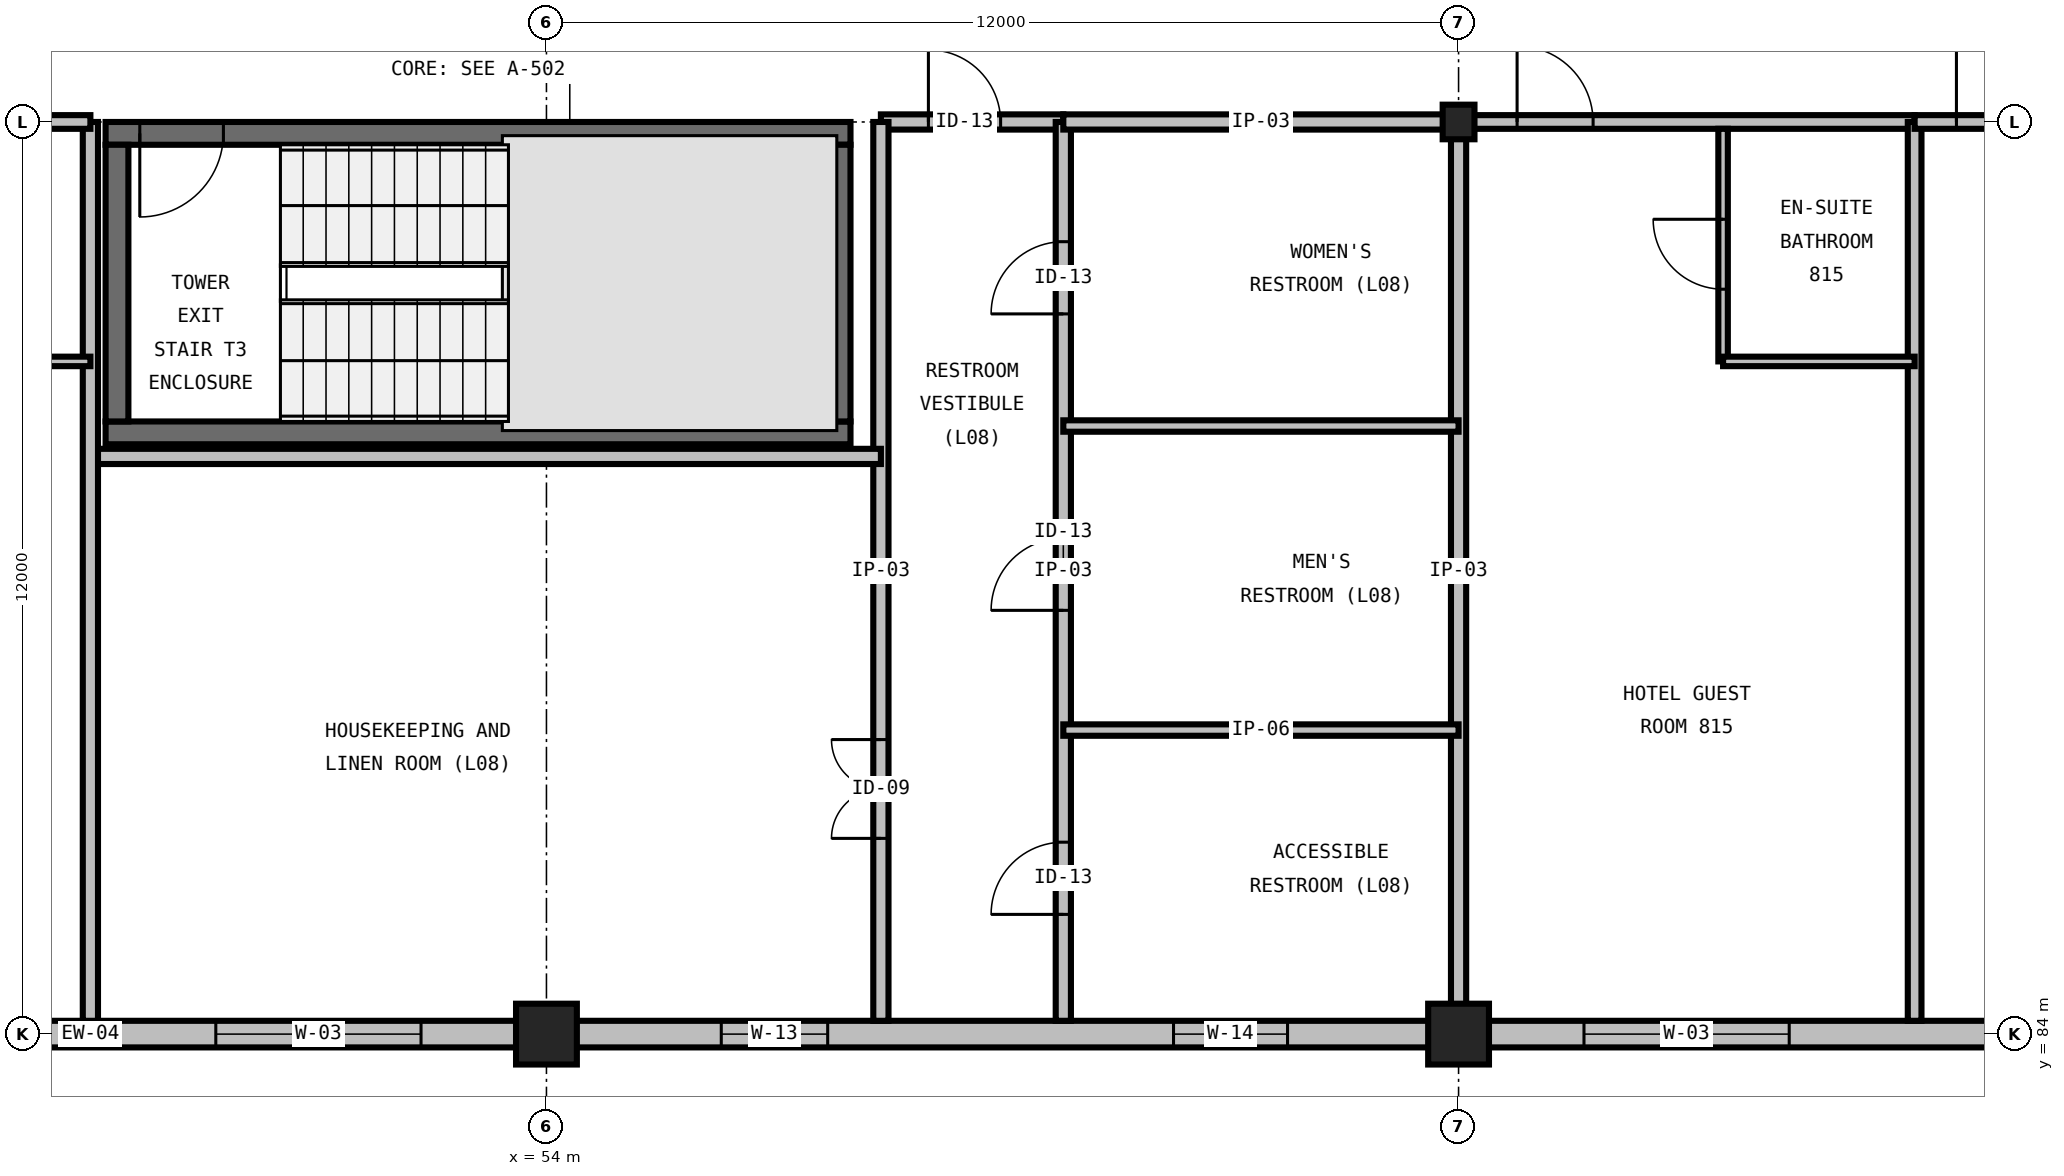
"""IFC4 building model, lengths in metres.
Left out: names, types, materials, properties, quantities, classifications, styles, units other than length and angle.
Written with IfcOpenShell. Run it as: python <this file> out.ifc"""

import sys

from ifc_helpers import new_model, si_unit, direction, frame, frame_2d, origin, origin_2d, place, context, subcontext, project, spatial, rectangle, i_section, extrude, element, fill, save


model = new_model("IFC4")
c1 = context("Model", 3, precision=1e-05, world=origin(), true_north=direction((0.0, 1.0)))
c2 = subcontext(c1, "Body", "Model", "MODEL_VIEW")
j1 = project(units=[si_unit("LENGTHUNIT", "METRE"), si_unit("PLANEANGLEUNIT", "RADIAN")], contexts=[c1])
p1 = place(None, origin())
s1 = spatial("IfcSite", under=j1, at=p1, CompositionType="ELEMENT")
p2 = place(p1, origin())
s2 = spatial("IfcBuilding", under=s1, at=p2, CompositionType="ELEMENT")
p3 = place(p2, frame((0.0, 0.0, 38.4)))
s3 = spatial("IfcBuildingStorey", under=s2, at=p3, CompositionType="ELEMENT", Elevation=38.4)
for number, where, z_axis, x_axis in (
    (1, (54.0, 84.0, 0.0), (0.0, 0.0, 1.0), (1.0, 0.0, 0.0)),
    (2, (66.0, 84.0, 0.0), (0.0, 0.0, 1.0), (1.0, 0.0, 0.0)),
):
    element("IfcColumn", number, at=place(p3, frame(where, z_axis=z_axis, x_axis=x_axis)), inside=s3, PredefinedType="COLUMN", context=c2, shape_type="SweptSolid", body=[
        extrude(rectangle(XDim=0.8, YDim=0.8, at=origin_2d()), origin(), (0.0, 0.0, 1.0), 3.6),
    ])
p4 = place(p3, frame((66.0, 96.0, 0.0), z_axis=(0.0, 0.0, 1.0), x_axis=(1.0, 0.0, 0.0)))
e3 = element("IfcColumn", 3, at=p4, inside=s3, PredefinedType="COLUMN", context=c2, shape_type="SweptSolid", body=[
    extrude(i_section(OverallWidth=0.419, OverallDepth=0.455, WebThickness=0.042, FlangeThickness=0.068, FilletRadius=0.031, at=origin_2d()), origin(), (0.0, 0.0, 1.0), 3.6),
])
p5 = place(p3, frame((48.2, 91.91, 0.0), z_axis=(0.0, 0.0, 1.0), x_axis=(1.0, 0.0, 0.0)))
e4 = element("IfcWall", 4, at=p5, inside=s3, PredefinedType="SHEAR", context=c2, shape_type="SweptSolid", body=[
    extrude(rectangle(XDim=9.8, YDim=0.3, at=frame_2d((4.9, 0.0))), origin(), (0.0, 0.0, 1.0), 3.6),
])
p6 = place(p3, frame((58.0, 95.85, 0.0), z_axis=(0.0, 0.0, 1.0), x_axis=(-1.0, 0.0, 0.0)))
e5 = element("IfcWall", 5, at=p6, inside=s3, PredefinedType="SHEAR", context=c2, shape_type="SweptSolid", body=[
    extrude(rectangle(XDim=9.8, YDim=0.3, at=frame_2d((4.9, 0.0))), origin(), (0.0, 0.0, 1.0), 3.6),
])
p7 = place(p6, frame((8.25, 0.0, 0.0)))
e6 = element("IfcOpeningElement", 6, at=p7, cuts=e5, PredefinedType="OPENING", context=c2, shape_type="SweptSolid", body=[
    extrude(rectangle(XDim=1.1, YDim=2.2, at=frame_2d((0.55, 1.1))), frame((0.0, 0.165, 0.0), z_axis=(0.0, -1.0, 0.0), x_axis=(1.0, 0.0, 0.0)), (0.0, 0.0, 1.0), 0.33),
])
for number, where, z_axis, x_axis in (
    (7, (48.35, 95.7, 0.0), (0.0, 0.0, 1.0), (0.0, -1.0, 0.0)),
    (8, (57.85, 92.06, 0.0), (0.0, 0.0, 1.0), (0.0, 1.0, 0.0)),
):
    element("IfcWall", number, at=place(p3, frame(where, z_axis=z_axis, x_axis=x_axis)), inside=s3, PredefinedType="SHEAR", context=c2, shape_type="SweptSolid", body=[
        extrude(rectangle(XDim=3.64, YDim=0.3, at=frame_2d((1.82, 0.0))), origin(), (0.0, 0.0, 1.0), 3.6),
    ])
p8 = place(p3, frame((42.0, 84.0, 0.0), z_axis=(0.0, 0.0, 1.0), x_axis=(1.0, 0.0, 0.0)))
e9 = element("IfcWall", 9, at=p8, inside=s3, PredefinedType="STANDARD", context=c2, shape_type="SweptSolid", body=[
    extrude(rectangle(XDim=12.0, YDim=0.35, at=frame_2d((6.0, 0.0))), origin(), (0.0, 0.0, 1.0), 2.486),
])
p9 = place(p8, frame((1.65, 0.0, 0.72)))
e10 = element("IfcOpeningElement", 10, at=p9, cuts=e9, PredefinedType="OPENING", context=c2, shape_type="SweptSolid", body=[
    extrude(rectangle(XDim=2.7, YDim=1.65, at=frame_2d((1.35, 0.825))), frame((0.0, 0.19, 0.0), z_axis=(0.0, -1.0, 0.0), x_axis=(1.0, 0.0, 0.0)), (0.0, 0.0, 1.0), 0.38),
])
p10 = place(p8, frame((7.65, 0.0, 0.72)))
e11 = element("IfcOpeningElement", 11, at=p10, cuts=e9, PredefinedType="OPENING", context=c2, shape_type="SweptSolid", body=[
    extrude(rectangle(XDim=2.7, YDim=1.65, at=frame_2d((1.35, 0.825))), frame((0.0, 0.19, 0.0), z_axis=(0.0, -1.0, 0.0), x_axis=(1.0, 0.0, 0.0)), (0.0, 0.0, 1.0), 0.38),
])
p11 = place(p3, frame((54.0, 84.0, 0.0), z_axis=(0.0, 0.0, 1.0), x_axis=(1.0, 0.0, 0.0)))
e12 = element("IfcWall", 12, at=p11, inside=s3, PredefinedType="STANDARD", context=c2, shape_type="SweptSolid", body=[
    extrude(rectangle(XDim=12.0, YDim=0.35, at=frame_2d((6.0, 0.0))), origin(), (0.0, 0.0, 1.0), 2.486),
])
p12 = place(p11, frame((2.3, 0.0, 1.0)))
e13 = element("IfcOpeningElement", 13, at=p12, cuts=e12, PredefinedType="OPENING", context=c2, shape_type="SweptSolid", body=[
    extrude(rectangle(XDim=1.4, YDim=1.4, at=frame_2d((0.7, 0.7))), frame((0.0, 0.19, 0.0), z_axis=(0.0, -1.0, 0.0), x_axis=(1.0, 0.0, 0.0)), (0.0, 0.0, 1.0), 0.38),
])
p13 = place(p11, frame((8.25, 0.0, 1.0)))
e14 = element("IfcOpeningElement", 14, at=p13, cuts=e12, PredefinedType="OPENING", context=c2, shape_type="SweptSolid", body=[
    extrude(rectangle(XDim=1.5, YDim=1.35, at=frame_2d((0.75, 0.675))), frame((0.0, 0.19, 0.0), z_axis=(0.0, -1.0, 0.0), x_axis=(1.0, 0.0, 0.0)), (0.0, 0.0, 1.0), 0.38),
])
p14 = place(p3, frame((66.0, 84.0, 0.0), z_axis=(0.0, 0.0, 1.0), x_axis=(1.0, 0.0, 0.0)))
e15 = element("IfcWall", 15, at=p14, inside=s3, PredefinedType="STANDARD", context=c2, shape_type="SweptSolid", body=[
    extrude(rectangle(XDim=12.0, YDim=0.35, at=frame_2d((6.0, 0.0))), origin(), (0.0, 0.0, 1.0), 2.486),
])
p15 = place(p14, frame((1.65, 0.0, 0.72)))
e16 = element("IfcOpeningElement", 16, at=p15, cuts=e15, PredefinedType="OPENING", context=c2, shape_type="SweptSolid", body=[
    extrude(rectangle(XDim=2.7, YDim=1.65, at=frame_2d((1.35, 0.825))), frame((0.0, 0.19, 0.0), z_axis=(0.0, -1.0, 0.0), x_axis=(1.0, 0.0, 0.0)), (0.0, 0.0, 1.0), 0.38),
])
p16 = place(p14, frame((7.65, 0.0, 0.72)))
e17 = element("IfcOpeningElement", 17, at=p16, cuts=e15, PredefinedType="OPENING", context=c2, shape_type="SweptSolid", body=[
    extrude(rectangle(XDim=2.7, YDim=1.65, at=frame_2d((1.35, 0.825))), frame((0.0, 0.19, 0.0), z_axis=(0.0, -1.0, 0.0), x_axis=(1.0, 0.0, 0.0)), (0.0, 0.0, 1.0), 0.38),
])
p17 = place(p3, frame((58.4, 96.0, 0.0), z_axis=(0.0, 0.0, 1.0), x_axis=(1.0, 0.0, 0.0)))
e18 = element("IfcWall", 18, at=p17, inside=s3, PredefinedType="PARTITIONING", context=c2, shape_type="SweptSolid", body=[
    extrude(rectangle(XDim=2.4, YDim=0.2, at=frame_2d((1.2, 0.0))), origin(), (0.0, 0.0, 1.0), 2.359),
])
p18 = place(p17, frame((0.625, 0.0, 0.0)))
e19 = element("IfcOpeningElement", 19, at=p18, cuts=e18, PredefinedType="OPENING", context=c2, shape_type="SweptSolid", body=[
    extrude(rectangle(XDim=0.95, YDim=2.15, at=frame_2d((0.475, 1.075))), frame((0.0, 0.115, 0.0), z_axis=(0.0, -1.0, 0.0), x_axis=(1.0, 0.0, 0.0)), (0.0, 0.0, 1.0), 0.23),
])
p19 = place(p3, frame((58.4, 84.175, 0.0), z_axis=(0.0, 0.0, 1.0), x_axis=(0.0, 1.0, 0.0)))
e20 = element("IfcWall", 20, at=p19, inside=s3, PredefinedType="PARTITIONING", context=c2, shape_type="SweptSolid", body=[
    extrude(rectangle(XDim=11.825, YDim=0.2, at=frame_2d((5.913, 0.0))), origin(), (0.0, 0.0, 1.0), 3.29),
])
p20 = place(p19, frame((2.4, 0.0, 0.0)))
e21 = element("IfcOpeningElement", 21, at=p20, cuts=e20, PredefinedType="OPENING", context=c2, shape_type="SweptSolid", body=[
    extrude(rectangle(XDim=1.3, YDim=2.2, at=frame_2d((0.65, 1.1))), frame((0.0, 0.115, 0.0), z_axis=(0.0, -1.0, 0.0), x_axis=(1.0, 0.0, 0.0)), (0.0, 0.0, 1.0), 0.23),
])
p21 = place(p3, frame((60.8, 84.175, 0.0), z_axis=(0.0, 0.0, 1.0), x_axis=(0.0, 1.0, 0.0)))
e22 = element("IfcWall", 22, at=p21, inside=s3, PredefinedType="PARTITIONING", context=c2, shape_type="SweptSolid", body=[
    extrude(rectangle(XDim=11.825, YDim=0.2, at=frame_2d((5.913, 0.0))), origin(), (0.0, 0.0, 1.0), 3.29),
])
p22 = place(p21, frame((1.4, 0.0, 0.0)))
e23 = element("IfcOpeningElement", 23, at=p22, cuts=e22, PredefinedType="OPENING", context=c2, shape_type="SweptSolid", body=[
    extrude(rectangle(XDim=0.95, YDim=2.15, at=frame_2d((0.475, 1.075))), frame((0.0, 0.115, 0.0), z_axis=(0.0, -1.0, 0.0), x_axis=(1.0, 0.0, 0.0)), (0.0, 0.0, 1.0), 0.23),
])
p23 = place(p21, frame((5.4, 0.0, 0.0)))
e24 = element("IfcOpeningElement", 24, at=p23, cuts=e22, PredefinedType="OPENING", context=c2, shape_type="SweptSolid", body=[
    extrude(rectangle(XDim=0.95, YDim=2.15, at=frame_2d((0.475, 1.075))), frame((0.0, 0.115, 0.0), z_axis=(0.0, -1.0, 0.0), x_axis=(1.0, 0.0, 0.0)), (0.0, 0.0, 1.0), 0.23),
])
p24 = place(p21, frame((9.3, 0.0, 0.0)))
e25 = element("IfcOpeningElement", 25, at=p24, cuts=e22, PredefinedType="OPENING", context=c2, shape_type="SweptSolid", body=[
    extrude(rectangle(XDim=0.95, YDim=2.15, at=frame_2d((0.475, 1.075))), frame((0.0, 0.115, 0.0), z_axis=(0.0, -1.0, 0.0), x_axis=(1.0, 0.0, 0.0)), (0.0, 0.0, 1.0), 0.23),
])
p25 = place(p3, frame((66.0, 84.175, 0.0), z_axis=(0.0, 0.0, 1.0), x_axis=(0.0, 1.0, 0.0)))
e26 = element("IfcWall", 26, at=p25, inside=s3, PredefinedType="PARTITIONING", context=c2, shape_type="SweptSolid", body=[
    extrude(rectangle(XDim=11.825, YDim=0.2, at=frame_2d((5.913, 0.0))), origin(), (0.0, 0.0, 1.0), 2.59),
])
p26 = place(p3, frame((60.8, 96.0, 0.0), z_axis=(0.0, 0.0, 1.0), x_axis=(1.0, 0.0, 0.0)))
e27 = element("IfcWall", 27, at=p26, inside=s3, PredefinedType="PARTITIONING", context=c2, shape_type="SweptSolid", body=[
    extrude(rectangle(XDim=5.2, YDim=0.2, at=frame_2d((2.6, 0.0))), origin(), (0.0, 0.0, 1.0), 2.359),
])
for number, where, z_axis, x_axis in (
    (28, (60.8, 88.0, 0.0), (0.0, 0.0, 1.0), (1.0, 0.0, 0.0)),
    (29, (60.8, 92.0, 0.0), (0.0, 0.0, 1.0), (1.0, 0.0, 0.0)),
):
    element("IfcWall", number, at=place(p3, frame(where, z_axis=z_axis, x_axis=x_axis)), inside=s3, PredefinedType="PARTITIONING", context=c2, shape_type="SweptSolid", body=[
        extrude(rectangle(XDim=5.2, YDim=0.15, at=frame_2d((2.6, 0.0))), origin(), (0.0, 0.0, 1.0), 3.29),
    ])
p27 = place(p3, frame((48.0, 91.6, 0.0), z_axis=(0.0, 0.0, 1.0), x_axis=(1.0, 0.0, 0.0)))
e30 = element("IfcWall", 30, at=p27, inside=s3, PredefinedType="PARTITIONING", context=c2, shape_type="SweptSolid", body=[
    extrude(rectangle(XDim=10.4, YDim=0.2, at=frame_2d((5.2, 0.0))), origin(), (0.0, 0.0, 1.0), 3.29),
])
p28 = place(p3, frame((48.0, 84.175, 0.0), z_axis=(0.0, 0.0, 1.0), x_axis=(0.0, 1.0, 0.0)))
e31 = element("IfcWall", 31, at=p28, inside=s3, PredefinedType="PARTITIONING", context=c2, shape_type="SweptSolid", body=[
    extrude(rectangle(XDim=11.825, YDim=0.2, at=frame_2d((5.913, 0.0))), origin(), (0.0, 0.0, 1.0), 3.29),
])
p29 = place(p3, frame((42.0, 96.0, 0.0), z_axis=(0.0, 0.0, 1.0), x_axis=(1.0, 0.0, 0.0)))
e32 = element("IfcWall", 32, at=p29, inside=s3, PredefinedType="PARTITIONING", context=c2, shape_type="SweptSolid", body=[
    extrude(rectangle(XDim=6.0, YDim=0.18, at=frame_2d((3.0, 0.0))), origin(), (0.0, 0.0, 1.0), 2.359),
])
p30 = place(p29, frame((0.77, 0.0, 0.0)))
e33 = element("IfcOpeningElement", 33, at=p30, cuts=e32, PredefinedType="OPENING", context=c2, shape_type="SweptSolid", body=[
    extrude(rectangle(XDim=1.0, YDim=2.15, at=frame_2d((0.5, 1.075))), frame((0.0, 0.105, 0.0), z_axis=(0.0, -1.0, 0.0), x_axis=(1.0, 0.0, 0.0)), (0.0, 0.0, 1.0), 0.21),
])
p31 = place(p3, frame((45.48, 92.85, 0.0), z_axis=(0.0, 0.0, 1.0), x_axis=(1.0, 0.0, 0.0)))
e34 = element("IfcWall", 34, at=p31, inside=s3, PredefinedType="PARTITIONING", context=c2, shape_type="SweptSolid", body=[
    extrude(rectangle(XDim=2.52, YDim=0.125, at=frame_2d((1.26, 0.0))), origin(), (0.0, 0.0, 1.0), 3.29),
])
p32 = place(p3, frame((66.0, 96.0, 0.0), z_axis=(0.0, 0.0, 1.0), x_axis=(1.0, 0.0, 0.0)))
e35 = element("IfcWall", 35, at=p32, inside=s3, PredefinedType="PARTITIONING", context=c2, shape_type="SweptSolid", body=[
    extrude(rectangle(XDim=6.0, YDim=0.18, at=frame_2d((3.0, 0.0))), origin(), (0.0, 0.0, 1.0), 2.664),
])
p33 = place(p32, frame((0.77, 0.0, 0.0)))
e36 = element("IfcOpeningElement", 36, at=p33, cuts=e35, PredefinedType="OPENING", context=c2, shape_type="SweptSolid", body=[
    extrude(rectangle(XDim=1.0, YDim=2.15, at=frame_2d((0.5, 1.075))), frame((0.0, 0.105, 0.0), z_axis=(0.0, -1.0, 0.0), x_axis=(1.0, 0.0, 0.0)), (0.0, 0.0, 1.0), 0.21),
])
p34 = place(p3, frame((72.0, 84.175, 0.0), z_axis=(0.0, 0.0, 1.0), x_axis=(0.0, 1.0, 0.0)))
e37 = element("IfcWall", 37, at=p34, inside=s3, PredefinedType="PARTITIONING", context=c2, shape_type="SweptSolid", body=[
    extrude(rectangle(XDim=11.825, YDim=0.18, at=frame_2d((5.913, 0.0))), origin(), (0.0, 0.0, 1.0), 3.29),
])
p35 = place(p3, frame((69.48, 92.85, 0.0), z_axis=(0.0, 0.0, 1.0), x_axis=(0.0, 1.0, 0.0)))
e38 = element("IfcWall", 38, at=p35, inside=s3, PredefinedType="PARTITIONING", context=c2, shape_type="SweptSolid", body=[
    extrude(rectangle(XDim=3.06, YDim=0.125, at=frame_2d((1.53, 0.0))), origin(), (0.0, 0.0, 1.0), 3.29),
])
p36 = place(p35, frame((0.95, 0.0, 0.0)))
e39 = element("IfcOpeningElement", 39, at=p36, cuts=e38, PredefinedType="OPENING", context=c2, shape_type="SweptSolid", body=[
    extrude(rectangle(XDim=0.92, YDim=2.1, at=frame_2d((0.46, 1.05))), frame((0.0, 0.077, 0.0), z_axis=(0.0, -1.0, 0.0), x_axis=(1.0, 0.0, 0.0)), (0.0, 0.0, 1.0), 0.155),
])
p37 = place(p3, frame((69.48, 92.85, 0.0), z_axis=(0.0, 0.0, 1.0), x_axis=(1.0, 0.0, 0.0)))
e40 = element("IfcWall", 40, at=p37, inside=s3, PredefinedType="PARTITIONING", context=c2, shape_type="SweptSolid", body=[
    extrude(rectangle(XDim=2.52, YDim=0.125, at=frame_2d((1.26, 0.0))), origin(), (0.0, 0.0, 1.0), 3.29),
])
p38 = place(p3, frame((72.0, 96.0, 0.0), z_axis=(0.0, 0.0, 1.0), x_axis=(1.0, 0.0, 0.0)))
e41 = element("IfcWall", 41, at=p38, inside=s3, PredefinedType="PARTITIONING", context=c2, shape_type="SweptSolid", body=[
    extrude(rectangle(XDim=6.0, YDim=0.18, at=frame_2d((3.0, 0.0))), origin(), (0.0, 0.0, 1.0), 2.664),
])
p39 = place(p38, frame((0.55, 0.0, 0.0)))
e42 = element("IfcOpeningElement", 42, at=p39, cuts=e41, PredefinedType="OPENING", context=c2, shape_type="SweptSolid", body=[
    extrude(rectangle(XDim=1.0, YDim=2.15, at=frame_2d((0.5, 1.075))), frame((0.0, 0.105, 0.0), z_axis=(0.0, -1.0, 0.0), x_axis=(1.0, 0.0, 0.0)), (0.0, 0.0, 1.0), 0.21),
])
p40 = place(p7, origin())
e43 = element("IfcDoor", 43, at=p40, inside=s3, OperationType="SINGLE_SWING_RIGHT", PredefinedType="DOOR", context=c2, shape_type="SweptSolid", body=[
    extrude(rectangle(XDim=1.1, YDim=2.2, at=frame_2d((0.55, 1.1))), frame((0.0, 0.025, 0.0), z_axis=(0.0, -1.0, 0.0), x_axis=(1.0, 0.0, 0.0)), (0.0, 0.0, 1.0), 0.05),
])
fill(e6, e43)
p41 = place(p10, origin())
e44 = element("IfcWindow", 44, at=p41, inside=s3, PartitioningType="TRIPLE_PANEL_VERTICAL", PredefinedType="WINDOW", context=c2, shape_type="SweptSolid", body=[
    extrude(rectangle(XDim=2.7, YDim=1.65, at=frame_2d((1.35, 0.825))), frame((0.0, 0.03, 0.0), z_axis=(0.0, -1.0, 0.0), x_axis=(1.0, 0.0, 0.0)), (0.0, 0.0, 1.0), 0.06),
])
fill(e11, e44)
p42 = place(p12, origin())
e45 = element("IfcWindow", 45, at=p42, inside=s3, PartitioningType="SINGLE_PANEL", PredefinedType="WINDOW", context=c2, shape_type="SweptSolid", body=[
    extrude(rectangle(XDim=1.4, YDim=1.4, at=frame_2d((0.7, 0.7))), frame((0.0, 0.03, 0.0), z_axis=(0.0, -1.0, 0.0), x_axis=(1.0, 0.0, 0.0)), (0.0, 0.0, 1.0), 0.06),
])
fill(e13, e45)
p43 = place(p13, origin())
e46 = element("IfcWindow", 46, at=p43, inside=s3, PartitioningType="SINGLE_PANEL", PredefinedType="WINDOW", context=c2, shape_type="SweptSolid", body=[
    extrude(rectangle(XDim=1.5, YDim=1.35, at=frame_2d((0.75, 0.675))), frame((0.0, 0.03, 0.0), z_axis=(0.0, -1.0, 0.0), x_axis=(1.0, 0.0, 0.0)), (0.0, 0.0, 1.0), 0.06),
])
fill(e14, e46)
p44 = place(p15, origin())
e47 = element("IfcWindow", 47, at=p44, inside=s3, PartitioningType="TRIPLE_PANEL_VERTICAL", PredefinedType="WINDOW", context=c2, shape_type="SweptSolid", body=[
    extrude(rectangle(XDim=2.7, YDim=1.65, at=frame_2d((1.35, 0.825))), frame((0.0, 0.03, 0.0), z_axis=(0.0, -1.0, 0.0), x_axis=(1.0, 0.0, 0.0)), (0.0, 0.0, 1.0), 0.06),
])
fill(e16, e47)
p45 = place(p18, origin())
e48 = element("IfcDoor", 48, at=p45, inside=s3, OperationType="SINGLE_SWING_LEFT", PredefinedType="DOOR", context=c2, shape_type="SweptSolid", body=[
    extrude(rectangle(XDim=0.95, YDim=2.15, at=frame_2d((0.475, 1.075))), frame((0.0, 0.025, 0.0), z_axis=(0.0, -1.0, 0.0), x_axis=(1.0, 0.0, 0.0)), (0.0, 0.0, 1.0), 0.05),
])
fill(e19, e48)
p46 = place(p20, origin())
e49 = element("IfcDoor", 49, at=p46, inside=s3, OperationType="DOUBLE_DOOR_SINGLE_SWING", PredefinedType="DOOR", context=c2, shape_type="SweptSolid", body=[
    extrude(rectangle(XDim=1.3, YDim=2.2, at=frame_2d((0.65, 1.1))), frame((0.0, 0.025, 0.0), z_axis=(0.0, -1.0, 0.0), x_axis=(1.0, 0.0, 0.0)), (0.0, 0.0, 1.0), 0.05),
])
fill(e21, e49)
p47 = place(p22, origin())
e50 = element("IfcDoor", 50, at=p47, inside=s3, OperationType="SINGLE_SWING_LEFT", PredefinedType="DOOR", context=c2, shape_type="SweptSolid", body=[
    extrude(rectangle(XDim=0.95, YDim=2.15, at=frame_2d((0.475, 1.075))), frame((0.0, 0.025, 0.0), z_axis=(0.0, -1.0, 0.0), x_axis=(1.0, 0.0, 0.0)), (0.0, 0.0, 1.0), 0.05),
])
fill(e23, e50)
p48 = place(p23, origin())
e51 = element("IfcDoor", 51, at=p48, inside=s3, OperationType="SINGLE_SWING_LEFT", PredefinedType="DOOR", context=c2, shape_type="SweptSolid", body=[
    extrude(rectangle(XDim=0.95, YDim=2.15, at=frame_2d((0.475, 1.075))), frame((0.0, 0.025, 0.0), z_axis=(0.0, -1.0, 0.0), x_axis=(1.0, 0.0, 0.0)), (0.0, 0.0, 1.0), 0.05),
])
fill(e24, e51)
p49 = place(p24, origin())
e52 = element("IfcDoor", 52, at=p49, inside=s3, OperationType="SINGLE_SWING_LEFT", PredefinedType="DOOR", context=c2, shape_type="SweptSolid", body=[
    extrude(rectangle(XDim=0.95, YDim=2.15, at=frame_2d((0.475, 1.075))), frame((0.0, 0.025, 0.0), z_axis=(0.0, -1.0, 0.0), x_axis=(1.0, 0.0, 0.0)), (0.0, 0.0, 1.0), 0.05),
])
fill(e25, e52)
p50 = place(p33, origin())
e53 = element("IfcDoor", 53, at=p50, inside=s3, OperationType="SINGLE_SWING_LEFT", PredefinedType="DOOR", context=c2, shape_type="SweptSolid", body=[
    extrude(rectangle(XDim=1.0, YDim=2.15, at=frame_2d((0.5, 1.075))), frame((0.0, 0.025, 0.0), z_axis=(0.0, -1.0, 0.0), x_axis=(1.0, 0.0, 0.0)), (0.0, 0.0, 1.0), 0.05),
])
fill(e36, e53)
p51 = place(p36, origin())
e54 = element("IfcDoor", 54, at=p51, inside=s3, OperationType="SINGLE_SWING_RIGHT", PredefinedType="DOOR", context=c2, shape_type="SweptSolid", body=[
    extrude(rectangle(XDim=0.92, YDim=2.1, at=frame_2d((0.46, 1.05))), frame((0.0, 0.025, 0.0), z_axis=(0.0, -1.0, 0.0), x_axis=(1.0, 0.0, 0.0)), (0.0, 0.0, 1.0), 0.05),
])
fill(e39, e54)
p52 = place(p39, origin())
e55 = element("IfcDoor", 55, at=p52, inside=s3, OperationType="SINGLE_SWING_LEFT", PredefinedType="DOOR", context=c2, shape_type="SweptSolid", body=[
    extrude(rectangle(XDim=1.0, YDim=2.15, at=frame_2d((0.5, 1.075))), frame((0.0, 0.025, 0.0), z_axis=(0.0, -1.0, 0.0), x_axis=(1.0, 0.0, 0.0)), (0.0, 0.0, 1.0), 0.05),
])
fill(e42, e55)
save(model, sys.argv[1])
